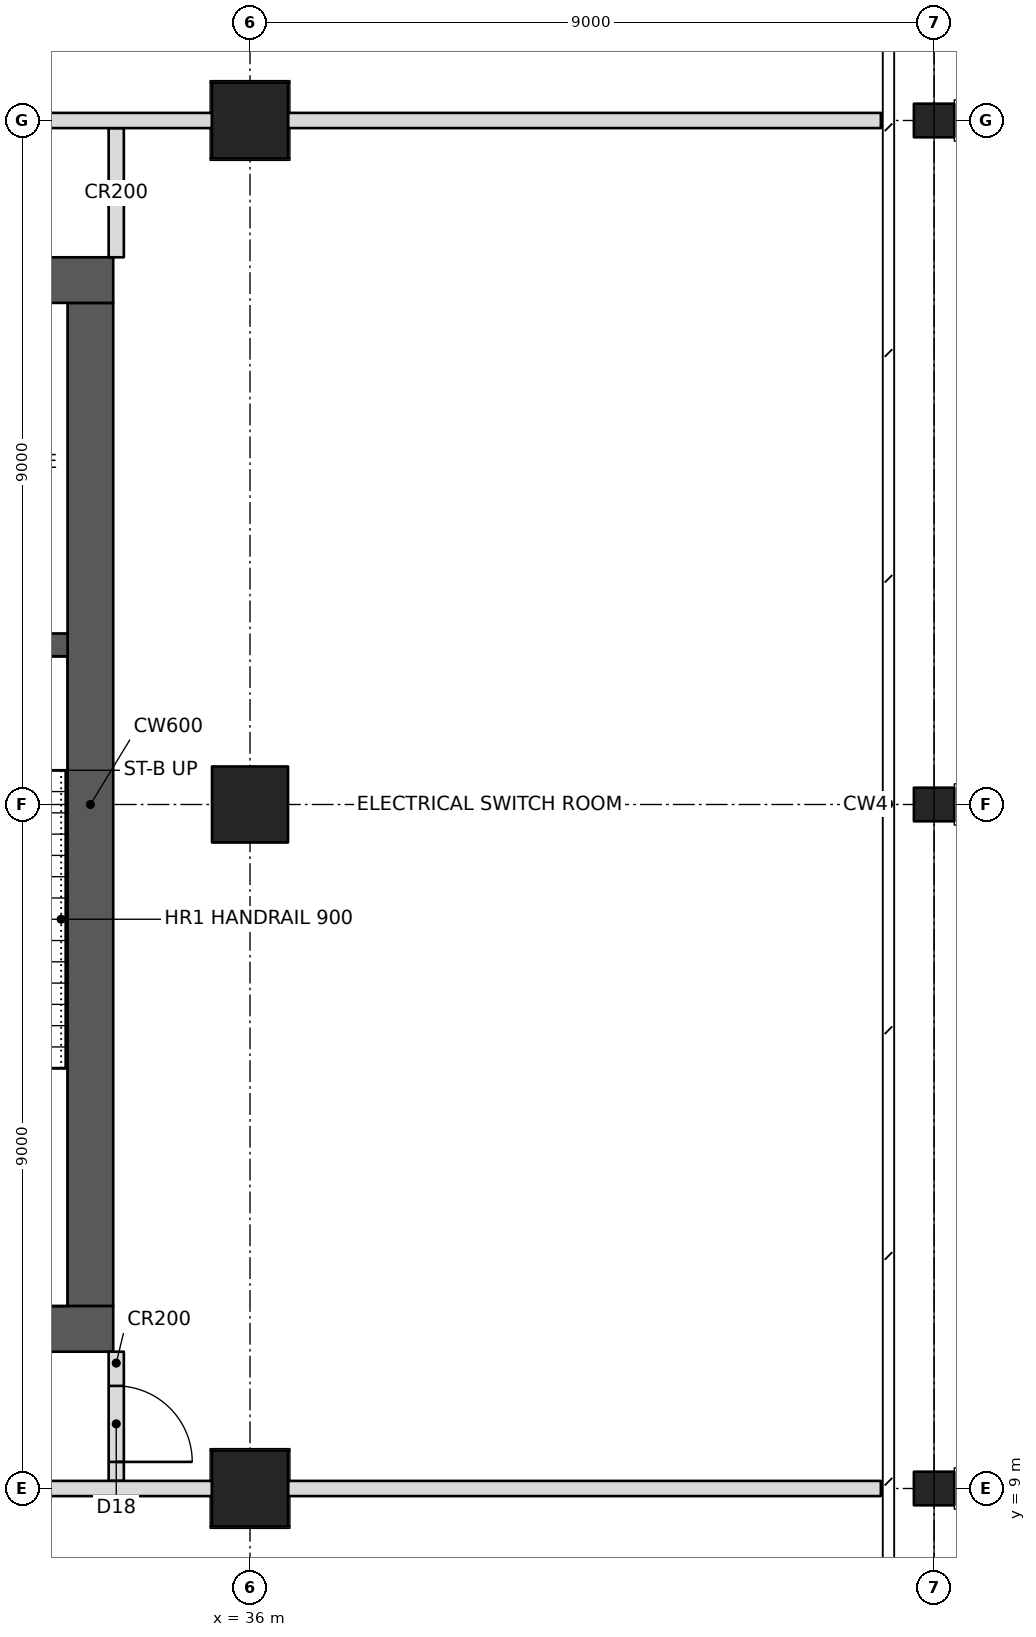
"""IFC4 building model, lengths in metres.
Left out: names, types, materials, properties, quantities, classifications, styles, units other than length and angle.
Written with IfcOpenShell. Run it as: python <this file> out.ifc"""

import sys

from ifc_helpers import new_model, si_unit, direction, frame, frame_2d, origin, origin_2d, place, context, subcontext, project, spatial, rectangle, hollow_rectangle, i_section, extrude, element, fill, save


model = new_model("IFC4")
c1 = context("Model", 3, precision=1e-05, world=origin(), true_north=direction((0.0, 1.0)))
c2 = subcontext(c1, "Body", "Model", "MODEL_VIEW")
j1 = project(units=[si_unit("LENGTHUNIT", "METRE"), si_unit("PLANEANGLEUNIT", "RADIAN")], contexts=[c1])
p1 = place(None, origin())
s1 = spatial("IfcSite", under=j1, at=p1, CompositionType="ELEMENT")
p2 = place(p1, origin())
s2 = spatial("IfcBuilding", under=s1, at=p2, CompositionType="ELEMENT")
p3 = place(p2, frame((0.0, 0.0, 155.4)))
s3 = spatial("IfcBuildingStorey", under=s2, at=p3, CompositionType="ELEMENT", Elevation=155.4)
for number, where, z_axis, x_axis in (
    (1, (36.0, 9.0, 0.0), (0.0, 0.0, 1.0), (0.0, 1.0, 0.0)),
    (2, (36.0, 18.0, 0.0), (0.0, 0.0, 1.0), (0.0, 1.0, 0.0)),
    (3, (36.0, 27.0, 0.0), (0.0, 0.0, 1.0), (1.0, 0.0, 0.0)),
):
    element("IfcColumn", number, at=place(p3, frame(where, z_axis=z_axis, x_axis=x_axis)), inside=s3, PredefinedType="COLUMN", context=c2, shape_type="SweptSolid", body=[
        extrude(hollow_rectangle(XDim=1.0, YDim=1.0, WallThickness=0.1, at=origin_2d()), origin(), (0.0, 0.0, 1.0), 5.0),
    ])
for number, where, z_axis, x_axis in (
    (4, (45.0, 9.0, 0.0), (0.0, 0.0, 1.0), (0.0, 1.0, 0.0)),
    (5, (45.0, 18.0, 0.0), (0.0, 0.0, 1.0), (0.0, 1.0, 0.0)),
    (6, (45.0, 27.0, 0.0), (0.0, 0.0, 1.0), (0.0, 1.0, 0.0)),
):
    element("IfcColumn", number, at=place(p3, frame(where, z_axis=z_axis, x_axis=x_axis)), inside=s3, PredefinedType="COLUMN", context=c2, shape_type="SweptSolid", body=[
        extrude(i_section(OverallWidth=0.442, OverallDepth=0.531, WebThickness=0.066, FlangeThickness=0.106, at=origin_2d()), origin(), (0.0, 0.0, 1.0), 5.0),
    ])
p4 = place(p3, frame((10.8, 11.1, 0.0), z_axis=(0.0, 0.0, 1.0), x_axis=(1.0, 0.0, 0.0)))
e7 = element("IfcWall", 7, at=p4, inside=s3, PredefinedType="SHEAR", context=c2, shape_type="SweptSolid", body=[
    extrude(rectangle(XDim=23.4, YDim=0.6, at=frame_2d((11.7, 0.0))), origin(), (0.0, 0.0, 1.0), 5.0),
])
p5 = place(p4, frame((1.0, 0.0, 0.0)))
e8 = element("IfcOpeningElement", 8, at=p5, cuts=e7, PredefinedType="OPENING", context=c2, shape_type="SweptSolid", body=[
    extrude(rectangle(XDim=1.0, YDim=2.1, at=frame_2d((0.5, 1.05))), frame((0.0, 0.31, 0.0), z_axis=(0.0, -1.0, 0.0), x_axis=(1.0, 0.0, 0.0)), (0.0, 0.0, 1.0), 0.62),
])
p6 = place(p4, frame((17.2, 0.0, 0.0)))
e9 = element("IfcOpeningElement", 9, at=p6, cuts=e7, PredefinedType="OPENING", context=c2, shape_type="SweptSolid", body=[
    extrude(rectangle(XDim=1.8, YDim=2.1, at=frame_2d((0.9, 1.05))), frame((0.0, 0.31, 0.0), z_axis=(0.0, -1.0, 0.0), x_axis=(1.0, 0.0, 0.0)), (0.0, 0.0, 1.0), 0.62),
])
p7 = place(p3, frame((10.8, 24.9, 0.0), z_axis=(0.0, 0.0, 1.0), x_axis=(1.0, 0.0, 0.0)))
e10 = element("IfcWall", 10, at=p7, inside=s3, PredefinedType="SHEAR", context=c2, shape_type="SweptSolid", body=[
    extrude(rectangle(XDim=23.4, YDim=0.6, at=frame_2d((11.7, 0.0))), origin(), (0.0, 0.0, 1.0), 5.0),
])
p8 = place(p7, frame((17.2, 0.0, 0.0)))
e11 = element("IfcOpeningElement", 11, at=p8, cuts=e10, PredefinedType="OPENING", context=c2, shape_type="SweptSolid", body=[
    extrude(rectangle(XDim=1.8, YDim=2.1, at=frame_2d((0.9, 1.05))), frame((0.0, 0.31, 0.0), z_axis=(0.0, -1.0, 0.0), x_axis=(1.0, 0.0, 0.0)), (0.0, 0.0, 1.0), 0.62),
])
p9 = place(p7, frame((21.1, 0.0, 0.0)))
e12 = element("IfcOpeningElement", 12, at=p9, cuts=e10, PredefinedType="OPENING", context=c2, shape_type="SweptSolid", body=[
    extrude(rectangle(XDim=1.0, YDim=2.1, at=frame_2d((0.5, 1.05))), frame((0.0, 0.31, 0.0), z_axis=(0.0, -1.0, 0.0), x_axis=(1.0, 0.0, 0.0)), (0.0, 0.0, 1.0), 0.62),
])
p10 = place(p7, frame((4.9, 0.0, 0.0)))
e13 = element("IfcOpeningElement", 13, at=p10, cuts=e10, PredefinedType="OPENING", context=c2, shape_type="SweptSolid", body=[
    extrude(rectangle(XDim=1.0, YDim=2.1, at=frame_2d((0.5, 1.05))), frame((0.0, 0.31, 0.0), z_axis=(0.0, -1.0, 0.0), x_axis=(1.0, 0.0, 0.0)), (0.0, 0.0, 1.0), 0.62),
])
p11 = place(p3, frame((33.9, 11.4, 0.0), z_axis=(0.0, 0.0, 1.0), x_axis=(0.0, 1.0, 0.0)))
e14 = element("IfcWall", 14, at=p11, inside=s3, PredefinedType="SHEAR", context=c2, shape_type="SweptSolid", body=[
    extrude(rectangle(XDim=13.2, YDim=0.6, at=frame_2d((6.6, 0.0))), origin(), (0.0, 0.0, 1.0), 5.0),
])
p12 = place(p3, frame((30.75, 20.1, 0.0), z_axis=(0.0, 0.0, 1.0), x_axis=(1.0, 0.0, 0.0)))
e15 = element("IfcWall", 15, at=p12, inside=s3, PredefinedType="SHEAR", context=c2, shape_type="SweptSolid", body=[
    extrude(rectangle(XDim=2.85, YDim=0.3, at=frame_2d((1.425, 0.0))), origin(), (0.0, 0.0, 1.0), 5.0),
])
p13 = place(p12, frame((1.15, 0.0, 0.0)))
e16 = element("IfcOpeningElement", 16, at=p13, cuts=e15, PredefinedType="OPENING", context=c2, shape_type="SweptSolid", body=[
    extrude(rectangle(XDim=1.0, YDim=2.1, at=frame_2d((0.5, 1.05))), frame((0.0, 0.16, 0.0), z_axis=(0.0, -1.0, 0.0), x_axis=(1.0, 0.0, 0.0)), (0.0, 0.0, 1.0), 0.32),
])
p14 = place(p3, frame((27.5, 9.0, 0.0), z_axis=(0.0, 0.0, 1.0), x_axis=(1.0, 0.0, 0.0)))
e17 = element("IfcWall", 17, at=p14, inside=s3, PredefinedType="PARTITIONING", context=c2, shape_type="SweptSolid", body=[
    extrude(rectangle(XDim=8.0, YDim=0.2, at=frame_2d((4.0, 0.0))), origin(), (0.0, 0.0, 1.0), 4.005),
])
p15 = place(p3, frame((36.5, 9.0, 0.0), z_axis=(0.0, 0.0, 1.0), x_axis=(1.0, 0.0, 0.0)))
e18 = element("IfcWall", 18, at=p15, inside=s3, PredefinedType="PARTITIONING", context=c2, shape_type="SweptSolid", body=[
    extrude(rectangle(XDim=7.8, YDim=0.2, at=frame_2d((3.9, 0.0))), origin(), (0.0, 0.0, 1.0), 4.038),
])
p16 = place(p3, frame((34.24, 9.1, 0.0), z_axis=(0.0, 0.0, 1.0), x_axis=(0.0, 1.0, 0.0)))
e19 = element("IfcWall", 19, at=p16, inside=s3, PredefinedType="PARTITIONING", context=c2, shape_type="SweptSolid", body=[
    extrude(rectangle(XDim=1.7, YDim=0.2, at=frame_2d((0.85, 0.0))), origin(), (0.0, 0.0, 1.0), 4.004),
])
p17 = place(p16, frame((0.25, 0.0, 0.0)))
e20 = element("IfcOpeningElement", 20, at=p17, cuts=e19, PredefinedType="OPENING", context=c2, shape_type="SweptSolid", body=[
    extrude(rectangle(XDim=1.0, YDim=2.1, at=frame_2d((0.5, 1.05))), frame((0.0, 0.11, 0.0), z_axis=(0.0, -1.0, 0.0), x_axis=(1.0, 0.0, 0.0)), (0.0, 0.0, 1.0), 0.22),
])
p18 = place(p3, frame((27.5, 27.0, 0.0), z_axis=(0.0, 0.0, 1.0), x_axis=(1.0, 0.0, 0.0)))
e21 = element("IfcWall", 21, at=p18, inside=s3, PredefinedType="PARTITIONING", context=c2, shape_type="SweptSolid", body=[
    extrude(rectangle(XDim=8.0, YDim=0.2, at=frame_2d((4.0, 0.0))), origin(), (0.0, 0.0, 1.0), 4.005),
])
p19 = place(p3, frame((36.5, 27.0, 0.0), z_axis=(0.0, 0.0, 1.0), x_axis=(1.0, 0.0, 0.0)))
e22 = element("IfcWall", 22, at=p19, inside=s3, PredefinedType="PARTITIONING", context=c2, shape_type="SweptSolid", body=[
    extrude(rectangle(XDim=7.8, YDim=0.2, at=frame_2d((3.9, 0.0))), origin(), (0.0, 0.0, 1.0), 4.038),
])
p20 = place(p3, frame((34.24, 25.2, 0.0), z_axis=(0.0, 0.0, 1.0), x_axis=(0.0, 1.0, 0.0)))
e23 = element("IfcWall", 23, at=p20, inside=s3, PredefinedType="PARTITIONING", context=c2, shape_type="SweptSolid", body=[
    extrude(rectangle(XDim=1.7, YDim=0.2, at=frame_2d((0.85, 0.0))), origin(), (0.0, 0.0, 1.0), 4.004),
])
p21 = place(p17, frame((1.0, 0.0, 0.0), z_axis=(0.0, 0.0, 1.0), x_axis=(-1.0, 0.0, 0.0)))
e24 = element("IfcDoor", 24, at=p21, inside=s3, OperationType="SINGLE_SWING_RIGHT", PredefinedType="DOOR", context=c2, shape_type="SweptSolid", body=[
    extrude(rectangle(XDim=1.0, YDim=2.1, at=frame_2d((0.5, 1.05))), frame((0.0, 0.025, 0.0), z_axis=(0.0, -1.0, 0.0), x_axis=(1.0, 0.0, 0.0)), (0.0, 0.0, 1.0), 0.05),
])
fill(e20, e24)
save(model, sys.argv[1])
